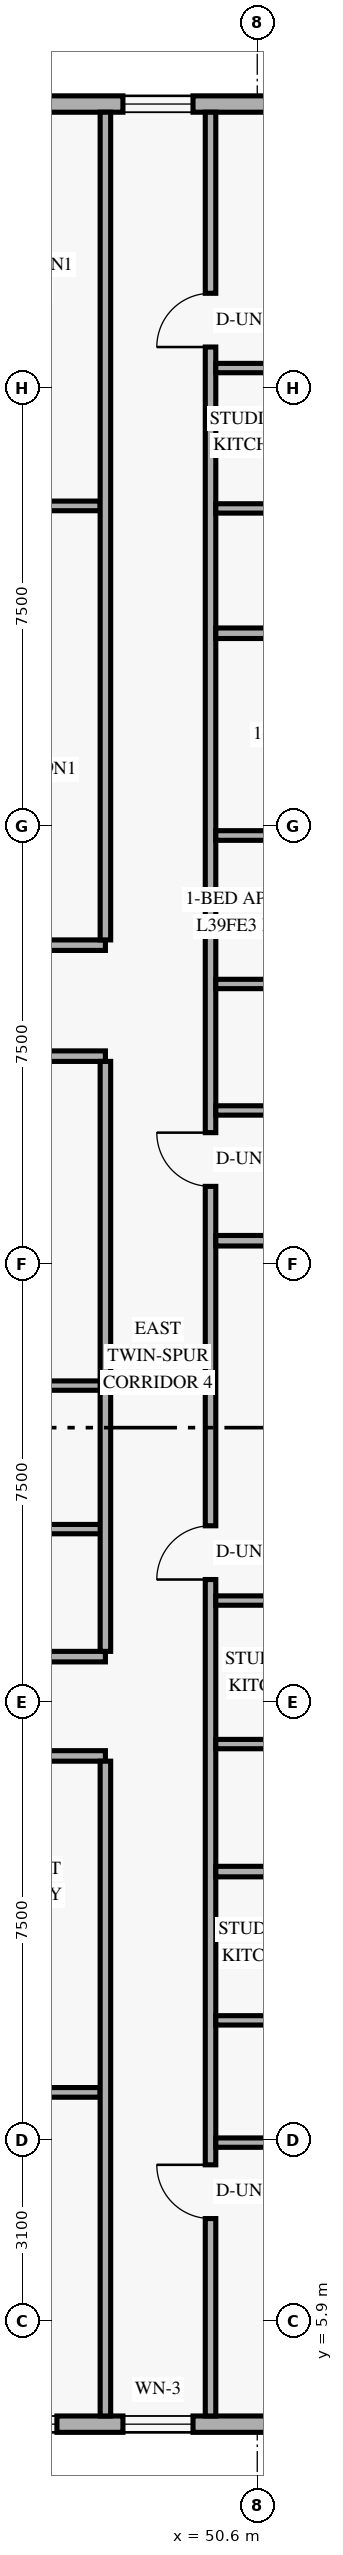
"""IFC4 building model, lengths in metres.
Left out: names, types, materials, properties, quantities, classifications, styles, units other than length and angle.
Written with IfcOpenShell. Run it as: python <this file> out.ifc"""

import sys

from ifc_helpers import new_model, si_unit, direction, frame, frame_2d, origin, place, context, subcontext, project, spatial, rectangle, extrude, element, fill, save


model = new_model("IFC4")
c1 = context("Model", 3, precision=1e-05, world=origin(), true_north=direction((0.0, 1.0)))
c2 = subcontext(c1, "Body", "Model", "MODEL_VIEW")
j1 = project(units=[si_unit("LENGTHUNIT", "METRE"), si_unit("PLANEANGLEUNIT", "RADIAN")], contexts=[c1])
p1 = place(None, origin())
s1 = spatial("IfcSite", under=j1, at=p1, CompositionType="ELEMENT")
p2 = place(p1, origin())
s2 = spatial("IfcBuilding", under=s1, at=p2, CompositionType="ELEMENT")
p3 = place(p2, frame((0.0, 0.0, 151.8)))
s3 = spatial("IfcBuildingStorey", under=s2, at=p3, CompositionType="ELEMENT", Elevation=151.8)
p4 = place(p3, frame((21.22, 4.14, 0.0), z_axis=(0.0, 0.0, 1.0), x_axis=(1.0, 0.0, 0.0)))
e1 = element("IfcWall", 1, at=p4, inside=s3, PredefinedType="SOLIDWALL", context=c2, shape_type="SweptSolid", body=[
    extrude(rectangle(XDim=33.76, YDim=0.28, at=frame_2d((16.88, 0.0))), origin(), (0.0, 0.0, 1.0), 3.36),
])
p5 = place(p4, frame((2.605, 0.0, 0.85)))
e2 = element("IfcOpeningElement", 2, at=p5, cuts=e1, PredefinedType="OPENING", context=c2, shape_type="SweptSolid", body=[
    extrude(rectangle(XDim=1.8, YDim=1.6, at=frame_2d((0.9, 0.8))), frame((0.0, 0.15, 0.0), z_axis=(0.0, -1.0, 0.0), x_axis=(1.0, 0.0, 0.0)), (0.0, 0.0, 1.0), 0.3),
])
p6 = place(p4, frame((9.49, 0.0, 0.85)))
e3 = element("IfcOpeningElement", 3, at=p6, cuts=e1, PredefinedType="OPENING", context=c2, shape_type="SweptSolid", body=[
    extrude(rectangle(XDim=1.8, YDim=1.6, at=frame_2d((0.9, 0.8))), frame((0.0, 0.15, 0.0), z_axis=(0.0, -1.0, 0.0), x_axis=(1.0, 0.0, 0.0)), (0.0, 0.0, 1.0), 0.3),
])
p7 = place(p4, frame((14.765, 0.0, 0.85)))
e4 = element("IfcOpeningElement", 4, at=p7, cuts=e1, PredefinedType="OPENING", context=c2, shape_type="SweptSolid", body=[
    extrude(rectangle(XDim=1.8, YDim=1.6, at=frame_2d((0.9, 0.8))), frame((0.0, 0.15, 0.0), z_axis=(0.0, -1.0, 0.0), x_axis=(1.0, 0.0, 0.0)), (0.0, 0.0, 1.0), 0.3),
])
p8 = place(p4, frame((19.325, 0.0, 0.85)))
e5 = element("IfcOpeningElement", 5, at=p8, cuts=e1, PredefinedType="OPENING", context=c2, shape_type="SweptSolid", body=[
    extrude(rectangle(XDim=1.8, YDim=1.6, at=frame_2d((0.9, 0.8))), frame((0.0, 0.15, 0.0), z_axis=(0.0, -1.0, 0.0), x_axis=(1.0, 0.0, 0.0)), (0.0, 0.0, 1.0), 0.3),
])
p9 = place(p4, frame((24.15, 0.0, 0.85)))
e6 = element("IfcOpeningElement", 6, at=p9, cuts=e1, PredefinedType="OPENING", context=c2, shape_type="SweptSolid", body=[
    extrude(rectangle(XDim=1.8, YDim=1.6, at=frame_2d((0.9, 0.8))), frame((0.0, 0.15, 0.0), z_axis=(0.0, -1.0, 0.0), x_axis=(1.0, 0.0, 0.0)), (0.0, 0.0, 1.0), 0.3),
])
p10 = place(p4, frame((27.08, 0.0, 0.85)))
e7 = element("IfcOpeningElement", 7, at=p10, cuts=e1, PredefinedType="OPENING", context=c2, shape_type="SweptSolid", body=[
    extrude(rectangle(XDim=1.2, YDim=1.5, at=frame_2d((0.6, 0.75))), frame((0.0, 0.15, 0.0), z_axis=(0.0, -1.0, 0.0), x_axis=(1.0, 0.0, 0.0)), (0.0, 0.0, 1.0), 0.3),
])
p11 = place(p4, frame((30.27, 0.0, 0.85)))
e8 = element("IfcOpeningElement", 8, at=p11, cuts=e1, PredefinedType="OPENING", context=c2, shape_type="SweptSolid", body=[
    extrude(rectangle(XDim=1.8, YDim=1.6, at=frame_2d((0.9, 0.8))), frame((0.0, 0.15, 0.0), z_axis=(0.0, -1.0, 0.0), x_axis=(1.0, 0.0, 0.0)), (0.0, 0.0, 1.0), 0.3),
])
p12 = place(p3, frame((54.98, 43.86, 0.0), z_axis=(0.0, 0.0, 1.0), x_axis=(-1.0, 0.0, 0.0)))
e9 = element("IfcWall", 9, at=p12, inside=s3, PredefinedType="SOLIDWALL", context=c2, shape_type="SweptSolid", body=[
    extrude(rectangle(XDim=33.76, YDim=0.28, at=frame_2d((16.88, 0.0))), origin(), (0.0, 0.0, 1.0), 3.36),
])
p13 = place(p12, frame((28.055, 0.0, 0.85)))
e10 = element("IfcOpeningElement", 10, at=p13, cuts=e9, PredefinedType="OPENING", context=c2, shape_type="SweptSolid", body=[
    extrude(rectangle(XDim=1.8, YDim=1.6, at=frame_2d((0.9, 0.8))), frame((0.0, 0.15, 0.0), z_axis=(0.0, -1.0, 0.0), x_axis=(1.0, 0.0, 0.0)), (0.0, 0.0, 1.0), 0.3),
])
p14 = place(p12, frame((21.17, 0.0, 0.85)))
e11 = element("IfcOpeningElement", 11, at=p14, cuts=e9, PredefinedType="OPENING", context=c2, shape_type="SweptSolid", body=[
    extrude(rectangle(XDim=1.8, YDim=1.6, at=frame_2d((0.9, 0.8))), frame((0.0, 0.15, 0.0), z_axis=(0.0, -1.0, 0.0), x_axis=(1.0, 0.0, 0.0)), (0.0, 0.0, 1.0), 0.3),
])
p15 = place(p12, frame((14.865, 0.0, 0.85)))
e12 = element("IfcOpeningElement", 12, at=p15, cuts=e9, PredefinedType="OPENING", context=c2, shape_type="SweptSolid", body=[
    extrude(rectangle(XDim=1.8, YDim=1.6, at=frame_2d((0.9, 0.8))), frame((0.0, 0.15, 0.0), z_axis=(0.0, -1.0, 0.0), x_axis=(1.0, 0.0, 0.0)), (0.0, 0.0, 1.0), 0.3),
])
p16 = place(p12, frame((8.575, 0.0, 0.85)))
e13 = element("IfcOpeningElement", 13, at=p16, cuts=e9, PredefinedType="OPENING", context=c2, shape_type="SweptSolid", body=[
    extrude(rectangle(XDim=1.8, YDim=1.6, at=frame_2d((0.9, 0.8))), frame((0.0, 0.15, 0.0), z_axis=(0.0, -1.0, 0.0), x_axis=(1.0, 0.0, 0.0)), (0.0, 0.0, 1.0), 0.3),
])
p17 = place(p12, frame((5.48, 0.0, 0.85)))
e14 = element("IfcOpeningElement", 14, at=p17, cuts=e9, PredefinedType="OPENING", context=c2, shape_type="SweptSolid", body=[
    extrude(rectangle(XDim=1.2, YDim=1.5, at=frame_2d((0.6, 0.75))), frame((0.0, 0.15, 0.0), z_axis=(0.0, -1.0, 0.0), x_axis=(1.0, 0.0, 0.0)), (0.0, 0.0, 1.0), 0.3),
])
p18 = place(p12, frame((1.69, 0.0, 0.85)))
e15 = element("IfcOpeningElement", 15, at=p18, cuts=e9, PredefinedType="OPENING", context=c2, shape_type="SweptSolid", body=[
    extrude(rectangle(XDim=1.8, YDim=1.6, at=frame_2d((0.9, 0.8))), frame((0.0, 0.15, 0.0), z_axis=(0.0, -1.0, 0.0), x_axis=(1.0, 0.0, 0.0)), (0.0, 0.0, 1.0), 0.3),
])
p19 = place(p3, frame((38.433, 15.58, 0.0), z_axis=(0.0, 0.0, 1.0), x_axis=(1.0, 0.0, 0.0)))
e16 = element("IfcWall", 16, at=p19, inside=s3, PredefinedType="STANDARD", context=c2, shape_type="SweptSolid", body=[
    extrude(rectangle(XDim=9.567, YDim=0.18, at=frame_2d((4.784, 0.0))), origin(), (0.0, 0.0, 1.0), 2.73),
])
p20 = place(p19, frame((0.327, 0.0, 0.0)))
e17 = element("IfcOpeningElement", 17, at=p20, cuts=e16, PredefinedType="OPENING", context=c2, shape_type="SweptSolid", body=[
    extrude(rectangle(XDim=0.92, YDim=2.15, at=frame_2d((0.46, 1.075))), frame((0.0, 0.1, 0.0), z_axis=(0.0, -1.0, 0.0), x_axis=(1.0, 0.0, 0.0)), (0.0, 0.0, 1.0), 0.2),
])
p21 = place(p3, frame((37.64, 17.28, 0.0), z_axis=(0.0, 0.0, 1.0), x_axis=(1.0, 0.0, 0.0)))
e18 = element("IfcWall", 18, at=p21, inside=s3, PredefinedType="STANDARD", context=c2, shape_type="SweptSolid", body=[
    extrude(rectangle(XDim=10.36, YDim=0.18, at=frame_2d((5.18, 0.0))), origin(), (0.0, 0.0, 1.0), 2.73),
])
p22 = place(p21, frame((5.625, 0.0, 0.0)))
e19 = element("IfcOpeningElement", 19, at=p22, cuts=e18, PredefinedType="OPENING", context=c2, shape_type="SweptSolid", body=[
    extrude(rectangle(XDim=0.92, YDim=2.15, at=frame_2d((0.46, 1.075))), frame((0.0, 0.1, 0.0), z_axis=(0.0, -1.0, 0.0), x_axis=(1.0, 0.0, 0.0)), (0.0, 0.0, 1.0), 0.2),
])
p23 = place(p3, frame((37.64, 27.56, 0.0), z_axis=(0.0, 0.0, 1.0), x_axis=(1.0, 0.0, 0.0)))
e20 = element("IfcWall", 20, at=p23, inside=s3, PredefinedType="STANDARD", context=c2, shape_type="SweptSolid", body=[
    extrude(rectangle(XDim=10.36, YDim=0.18, at=frame_2d((5.18, 0.0))), origin(), (0.0, 0.0, 1.0), 2.73),
])
p24 = place(p3, frame((35.51, 29.46, 0.0), z_axis=(0.0, 0.0, 1.0), x_axis=(1.0, 0.0, 0.0)))
e21 = element("IfcWall", 21, at=p24, inside=s3, PredefinedType="STANDARD", context=c2, shape_type="SweptSolid", body=[
    extrude(rectangle(XDim=12.49, YDim=0.18, at=frame_2d((6.245, 0.0))), origin(), (0.0, 0.0, 1.0), 2.73),
])
p25 = place(p24, frame((0.32, 0.0, 0.0)))
e22 = element("IfcOpeningElement", 22, at=p25, cuts=e21, PredefinedType="OPENING", context=c2, shape_type="SweptSolid", body=[
    extrude(rectangle(XDim=0.92, YDim=2.15, at=frame_2d((0.46, 1.075))), frame((0.0, 0.1, 0.0), z_axis=(0.0, -1.0, 0.0), x_axis=(1.0, 0.0, 0.0)), (0.0, 0.0, 1.0), 0.2),
])
p26 = place(p3, frame((44.62, 9.82, 0.0), z_axis=(0.0, 0.0, 1.0), x_axis=(1.0, 0.0, 0.0)))
e23 = element("IfcWall", 23, at=p26, inside=s3, PredefinedType="PARTITIONING", context=c2, shape_type="SweptSolid", body=[
    extrude(rectangle(XDim=3.29, YDim=0.165, at=frame_2d((1.645, 0.0))), origin(), (0.0, 0.0, 1.0), 2.73),
])
p27 = place(p3, frame((43.09, 36.98, 0.0), z_axis=(0.0, 0.0, 1.0), x_axis=(1.0, 0.0, 0.0)))
e24 = element("IfcWall", 24, at=p27, inside=s3, PredefinedType="PARTITIONING", context=c2, shape_type="SweptSolid", body=[
    extrude(rectangle(XDim=4.82, YDim=0.165, at=frame_2d((2.41, 0.0))), origin(), (0.0, 0.0, 1.0), 2.73),
])
p28 = place(p3, frame((45.38, 21.92, 0.0), z_axis=(0.0, 0.0, 1.0), x_axis=(1.0, 0.0, 0.0)))
e25 = element("IfcWall", 25, at=p28, inside=s3, PredefinedType="PLUMBINGWALL", context=c2, shape_type="SweptSolid", body=[
    extrude(rectangle(XDim=2.62, YDim=0.16, at=frame_2d((1.31, 0.0))), origin(), (0.0, 0.0, 1.0), 2.73),
])
p29 = place(p3, frame((45.54, 19.463, 0.0), z_axis=(0.0, 0.0, 1.0), x_axis=(1.0, 0.0, 0.0)))
e26 = element("IfcWall", 26, at=p29, inside=s3, PredefinedType="PLUMBINGWALL", context=c2, shape_type="SweptSolid", body=[
    extrude(rectangle(XDim=2.46, YDim=0.16, at=frame_2d((1.23, 0.0))), origin(), (0.0, 0.0, 1.0), 3.36),
])
p30 = place(p3, frame((49.8, 4.28, 0.0), z_axis=(0.0, 0.0, 1.0), x_axis=(0.0, 1.0, 0.0)))
e27 = element("IfcWall", 27, at=p30, inside=s3, PredefinedType="STANDARD", context=c2, shape_type="SweptSolid", body=[
    extrude(rectangle(XDim=39.44, YDim=0.18, at=frame_2d((19.72, 0.0))), origin(), (0.0, 0.0, 1.0), 2.73),
])
p31 = place(p30, frame((3.38, 0.0, 0.0)))
e28 = element("IfcOpeningElement", 28, at=p31, cuts=e27, PredefinedType="OPENING", context=c2, shape_type="SweptSolid", body=[
    extrude(rectangle(XDim=0.92, YDim=2.15, at=frame_2d((0.46, 1.075))), frame((0.0, 0.1, 0.0), z_axis=(0.0, -1.0, 0.0), x_axis=(1.0, 0.0, 0.0)), (0.0, 0.0, 1.0), 0.2),
])
p32 = place(p30, frame((14.32, 0.0, 0.0)))
e29 = element("IfcOpeningElement", 29, at=p32, cuts=e27, PredefinedType="OPENING", context=c2, shape_type="SweptSolid", body=[
    extrude(rectangle(XDim=0.92, YDim=2.15, at=frame_2d((0.46, 1.075))), frame((0.0, 0.1, 0.0), z_axis=(0.0, -1.0, 0.0), x_axis=(1.0, 0.0, 0.0)), (0.0, 0.0, 1.0), 0.2),
])
p33 = place(p30, frame((21.05, 0.0, 0.0)))
e30 = element("IfcOpeningElement", 30, at=p33, cuts=e27, PredefinedType="OPENING", context=c2, shape_type="SweptSolid", body=[
    extrude(rectangle(XDim=0.92, YDim=2.15, at=frame_2d((0.46, 1.075))), frame((0.0, 0.1, 0.0), z_axis=(0.0, -1.0, 0.0), x_axis=(1.0, 0.0, 0.0)), (0.0, 0.0, 1.0), 0.2),
])
p34 = place(p30, frame((35.42, 0.0, 0.0)))
e31 = element("IfcOpeningElement", 31, at=p34, cuts=e27, PredefinedType="OPENING", context=c2, shape_type="SweptSolid", body=[
    extrude(rectangle(XDim=0.92, YDim=2.15, at=frame_2d((0.46, 1.075))), frame((0.0, 0.1, 0.0), z_axis=(0.0, -1.0, 0.0), x_axis=(1.0, 0.0, 0.0)), (0.0, 0.0, 1.0), 0.2),
])
p35 = place(p3, frame((48.0, 4.28, 0.0), z_axis=(0.0, 0.0, 1.0), x_axis=(0.0, 1.0, 0.0)))
e32 = element("IfcWall", 32, at=p35, inside=s3, PredefinedType="STANDARD", context=c2, shape_type="SweptSolid", body=[
    extrude(rectangle(XDim=11.21, YDim=0.18, at=frame_2d((5.605, 0.0))), origin(), (0.0, 0.0, 1.0), 2.73),
])
p36 = place(p3, frame((48.0, 17.37, 0.0), z_axis=(0.0, 0.0, 1.0), x_axis=(0.0, 1.0, 0.0)))
e33 = element("IfcWall", 33, at=p36, inside=s3, PredefinedType="STANDARD", context=c2, shape_type="SweptSolid", body=[
    extrude(rectangle(XDim=10.1, YDim=0.18, at=frame_2d((5.05, 0.0))), origin(), (0.0, 0.0, 1.0), 2.73),
])
p37 = place(p3, frame((48.0, 29.55, 0.0), z_axis=(0.0, 0.0, 1.0), x_axis=(0.0, 1.0, 0.0)))
e34 = element("IfcWall", 34, at=p37, inside=s3, PredefinedType="STANDARD", context=c2, shape_type="SweptSolid", body=[
    extrude(rectangle(XDim=14.17, YDim=0.18, at=frame_2d((7.085, 0.0))), origin(), (0.0, 0.0, 1.0), 2.73),
])
p38 = place(p3, frame((49.89, 8.96, 0.0), z_axis=(0.0, 0.0, 1.0), x_axis=(1.0, 0.0, 0.0)))
e35 = element("IfcWall", 35, at=p38, inside=s3, PredefinedType="PLUMBINGWALL", context=c2, shape_type="SweptSolid", body=[
    extrude(rectangle(XDim=3.78, YDim=0.16, at=frame_2d((1.89, 0.0))), origin(), (0.0, 0.0, 1.0), 2.879),
])
p39 = place(p3, frame((49.89, 11.053, 0.0), z_axis=(0.0, 0.0, 1.0), x_axis=(1.0, 0.0, 0.0)))
e36 = element("IfcWall", 36, at=p39, inside=s3, PredefinedType="PLUMBINGWALL", context=c2, shape_type="SweptSolid", body=[
    extrude(rectangle(XDim=3.62, YDim=0.16, at=frame_2d((1.81, 0.0))), origin(), (0.0, 0.0, 1.0), 2.879),
])
p40 = place(p3, frame((49.89, 13.6, 0.0), z_axis=(0.0, 0.0, 1.0), x_axis=(1.0, 0.0, 0.0)))
e37 = element("IfcWall", 37, at=p40, inside=s3, PredefinedType="PARTITIONING", context=c2, shape_type="SweptSolid", body=[
    extrude(rectangle(XDim=8.43, YDim=0.18, at=frame_2d((4.215, 0.0))), origin(), (0.0, 0.0, 1.0), 2.879),
])
p41 = place(p3, frame((49.89, 18.24, 0.0), z_axis=(0.0, 0.0, 1.0), x_axis=(1.0, 0.0, 0.0)))
e38 = element("IfcWall", 38, at=p41, inside=s3, PredefinedType="PLUMBINGWALL", context=c2, shape_type="SweptSolid", body=[
    extrude(rectangle(XDim=3.78, YDim=0.16, at=frame_2d((1.89, 0.0))), origin(), (0.0, 0.0, 1.0), 2.879),
])
p42 = place(p3, frame((49.89, 15.783, 0.0), z_axis=(0.0, 0.0, 1.0), x_axis=(1.0, 0.0, 0.0)))
e39 = element("IfcWall", 39, at=p42, inside=s3, PredefinedType="PLUMBINGWALL", context=c2, shape_type="SweptSolid", body=[
    extrude(rectangle(XDim=3.62, YDim=0.16, at=frame_2d((1.81, 0.0))), origin(), (0.0, 0.0, 1.0), 2.879),
])
p43 = place(p3, frame((49.89, 24.4, 0.0), z_axis=(0.0, 0.0, 1.0), x_axis=(1.0, 0.0, 0.0)))
e40 = element("IfcWall", 40, at=p43, inside=s3, PredefinedType="PARTITIONING", context=c2, shape_type="SweptSolid", body=[
    extrude(rectangle(XDim=8.43, YDim=0.18, at=frame_2d((4.215, 0.0))), origin(), (0.0, 0.0, 1.0), 2.879),
])
p44 = place(p3, frame((49.89, 31.337, 0.0), z_axis=(0.0, 0.0, 1.0), x_axis=(1.0, 0.0, 0.0)))
e41 = element("IfcWall", 41, at=p44, inside=s3, PredefinedType="PARTITIONING", context=c2, shape_type="SweptSolid", body=[
    extrude(rectangle(XDim=8.43, YDim=0.165, at=frame_2d((4.215, 0.0))), origin(), (0.0, 0.0, 1.0), 2.879),
])
p45 = place(p44, frame((5.77, 0.0, 0.0)))
e42 = element("IfcOpeningElement", 42, at=p45, cuts=e41, PredefinedType="OPENING", context=c2, shape_type="SweptSolid", body=[
    extrude(rectangle(XDim=0.9, YDim=2.14, at=frame_2d((0.45, 1.07))), frame((0.0, 0.093, 0.0), z_axis=(0.0, -1.0, 0.0), x_axis=(1.0, 0.0, 0.0)), (0.0, 0.0, 1.0), 0.185),
])
p46 = place(p3, frame((49.89, 26.63, 0.0), z_axis=(0.0, 0.0, 1.0), x_axis=(1.0, 0.0, 0.0)))
e43 = element("IfcWall", 43, at=p46, inside=s3, PredefinedType="PLUMBINGWALL", context=c2, shape_type="SweptSolid", body=[
    extrude(rectangle(XDim=3.78, YDim=0.16, at=frame_2d((1.89, 0.0))), origin(), (0.0, 0.0, 1.0), 2.879),
])
p47 = place(p3, frame((49.89, 28.796, 0.0), z_axis=(0.0, 0.0, 1.0), x_axis=(1.0, 0.0, 0.0)))
e44 = element("IfcWall", 44, at=p47, inside=s3, PredefinedType="PLUMBINGWALL", context=c2, shape_type="SweptSolid", body=[
    extrude(rectangle(XDim=3.62, YDim=0.16, at=frame_2d((1.81, 0.0))), origin(), (0.0, 0.0, 1.0), 2.879),
])
p48 = place(p3, frame((49.89, 34.8, 0.0), z_axis=(0.0, 0.0, 1.0), x_axis=(1.0, 0.0, 0.0)))
e45 = element("IfcWall", 45, at=p48, inside=s3, PredefinedType="PARTITIONING", context=c2, shape_type="SweptSolid", body=[
    extrude(rectangle(XDim=8.43, YDim=0.18, at=frame_2d((4.215, 0.0))), origin(), (0.0, 0.0, 1.0), 2.879),
])
p49 = place(p3, frame((49.89, 39.34, 0.0), z_axis=(0.0, 0.0, 1.0), x_axis=(1.0, 0.0, 0.0)))
e46 = element("IfcWall", 46, at=p49, inside=s3, PredefinedType="PLUMBINGWALL", context=c2, shape_type="SweptSolid", body=[
    extrude(rectangle(XDim=3.78, YDim=0.16, at=frame_2d((1.89, 0.0))), origin(), (0.0, 0.0, 1.0), 2.879),
])
p50 = place(p3, frame((49.89, 36.937, 0.0), z_axis=(0.0, 0.0, 1.0), x_axis=(1.0, 0.0, 0.0)))
e47 = element("IfcWall", 47, at=p50, inside=s3, PredefinedType="PLUMBINGWALL", context=c2, shape_type="SweptSolid", body=[
    extrude(rectangle(XDim=3.62, YDim=0.16, at=frame_2d((1.81, 0.0))), origin(), (0.0, 0.0, 1.0), 2.879),
])
p51 = place(p9, origin())
e48 = element("IfcWindow", 48, at=p51, inside=s3, PartitioningType="SINGLE_PANEL", PredefinedType="WINDOW", context=c2, shape_type="SweptSolid", body=[
    extrude(rectangle(XDim=1.8, YDim=1.6, at=frame_2d((0.9, 0.8))), frame((0.0, 0.03, 0.0), z_axis=(0.0, -1.0, 0.0), x_axis=(1.0, 0.0, 0.0)), (0.0, 0.0, 1.0), 0.06),
])
fill(e6, e48)
p52 = place(p10, origin())
e49 = element("IfcWindow", 49, at=p52, inside=s3, PartitioningType="SINGLE_PANEL", PredefinedType="WINDOW", context=c2, shape_type="SweptSolid", body=[
    extrude(rectangle(XDim=1.2, YDim=1.5, at=frame_2d((0.6, 0.75))), frame((0.0, 0.03, 0.0), z_axis=(0.0, -1.0, 0.0), x_axis=(1.0, 0.0, 0.0)), (0.0, 0.0, 1.0), 0.06),
])
fill(e7, e49)
p53 = place(p17, origin())
e50 = element("IfcWindow", 50, at=p53, inside=s3, PartitioningType="SINGLE_PANEL", PredefinedType="WINDOW", context=c2, shape_type="SweptSolid", body=[
    extrude(rectangle(XDim=1.2, YDim=1.5, at=frame_2d((0.6, 0.75))), frame((0.0, 0.03, 0.0), z_axis=(0.0, -1.0, 0.0), x_axis=(1.0, 0.0, 0.0)), (0.0, 0.0, 1.0), 0.06),
])
fill(e14, e50)
p54 = place(p31, origin())
e51 = element("IfcDoor", 51, at=p54, inside=s3, OperationType="SINGLE_SWING_RIGHT", PredefinedType="DOOR", context=c2, shape_type="SweptSolid", body=[
    extrude(rectangle(XDim=0.92, YDim=2.15, at=frame_2d((0.46, 1.075))), frame((0.0, 0.025, 0.0), z_axis=(0.0, -1.0, 0.0), x_axis=(1.0, 0.0, 0.0)), (0.0, 0.0, 1.0), 0.05),
])
fill(e28, e51)
p55 = place(p32, origin())
e52 = element("IfcDoor", 52, at=p55, inside=s3, OperationType="SINGLE_SWING_LEFT", PredefinedType="DOOR", context=c2, shape_type="SweptSolid", body=[
    extrude(rectangle(XDim=0.92, YDim=2.15, at=frame_2d((0.46, 1.075))), frame((0.0, 0.025, 0.0), z_axis=(0.0, -1.0, 0.0), x_axis=(1.0, 0.0, 0.0)), (0.0, 0.0, 1.0), 0.05),
])
fill(e29, e52)
p56 = place(p33, origin())
e53 = element("IfcDoor", 53, at=p56, inside=s3, OperationType="SINGLE_SWING_RIGHT", PredefinedType="DOOR", context=c2, shape_type="SweptSolid", body=[
    extrude(rectangle(XDim=0.92, YDim=2.15, at=frame_2d((0.46, 1.075))), frame((0.0, 0.025, 0.0), z_axis=(0.0, -1.0, 0.0), x_axis=(1.0, 0.0, 0.0)), (0.0, 0.0, 1.0), 0.05),
])
fill(e30, e53)
p57 = place(p34, origin())
e54 = element("IfcDoor", 54, at=p57, inside=s3, OperationType="SINGLE_SWING_LEFT", PredefinedType="DOOR", context=c2, shape_type="SweptSolid", body=[
    extrude(rectangle(XDim=0.92, YDim=2.15, at=frame_2d((0.46, 1.075))), frame((0.0, 0.025, 0.0), z_axis=(0.0, -1.0, 0.0), x_axis=(1.0, 0.0, 0.0)), (0.0, 0.0, 1.0), 0.05),
])
fill(e31, e54)
save(model, sys.argv[1])
